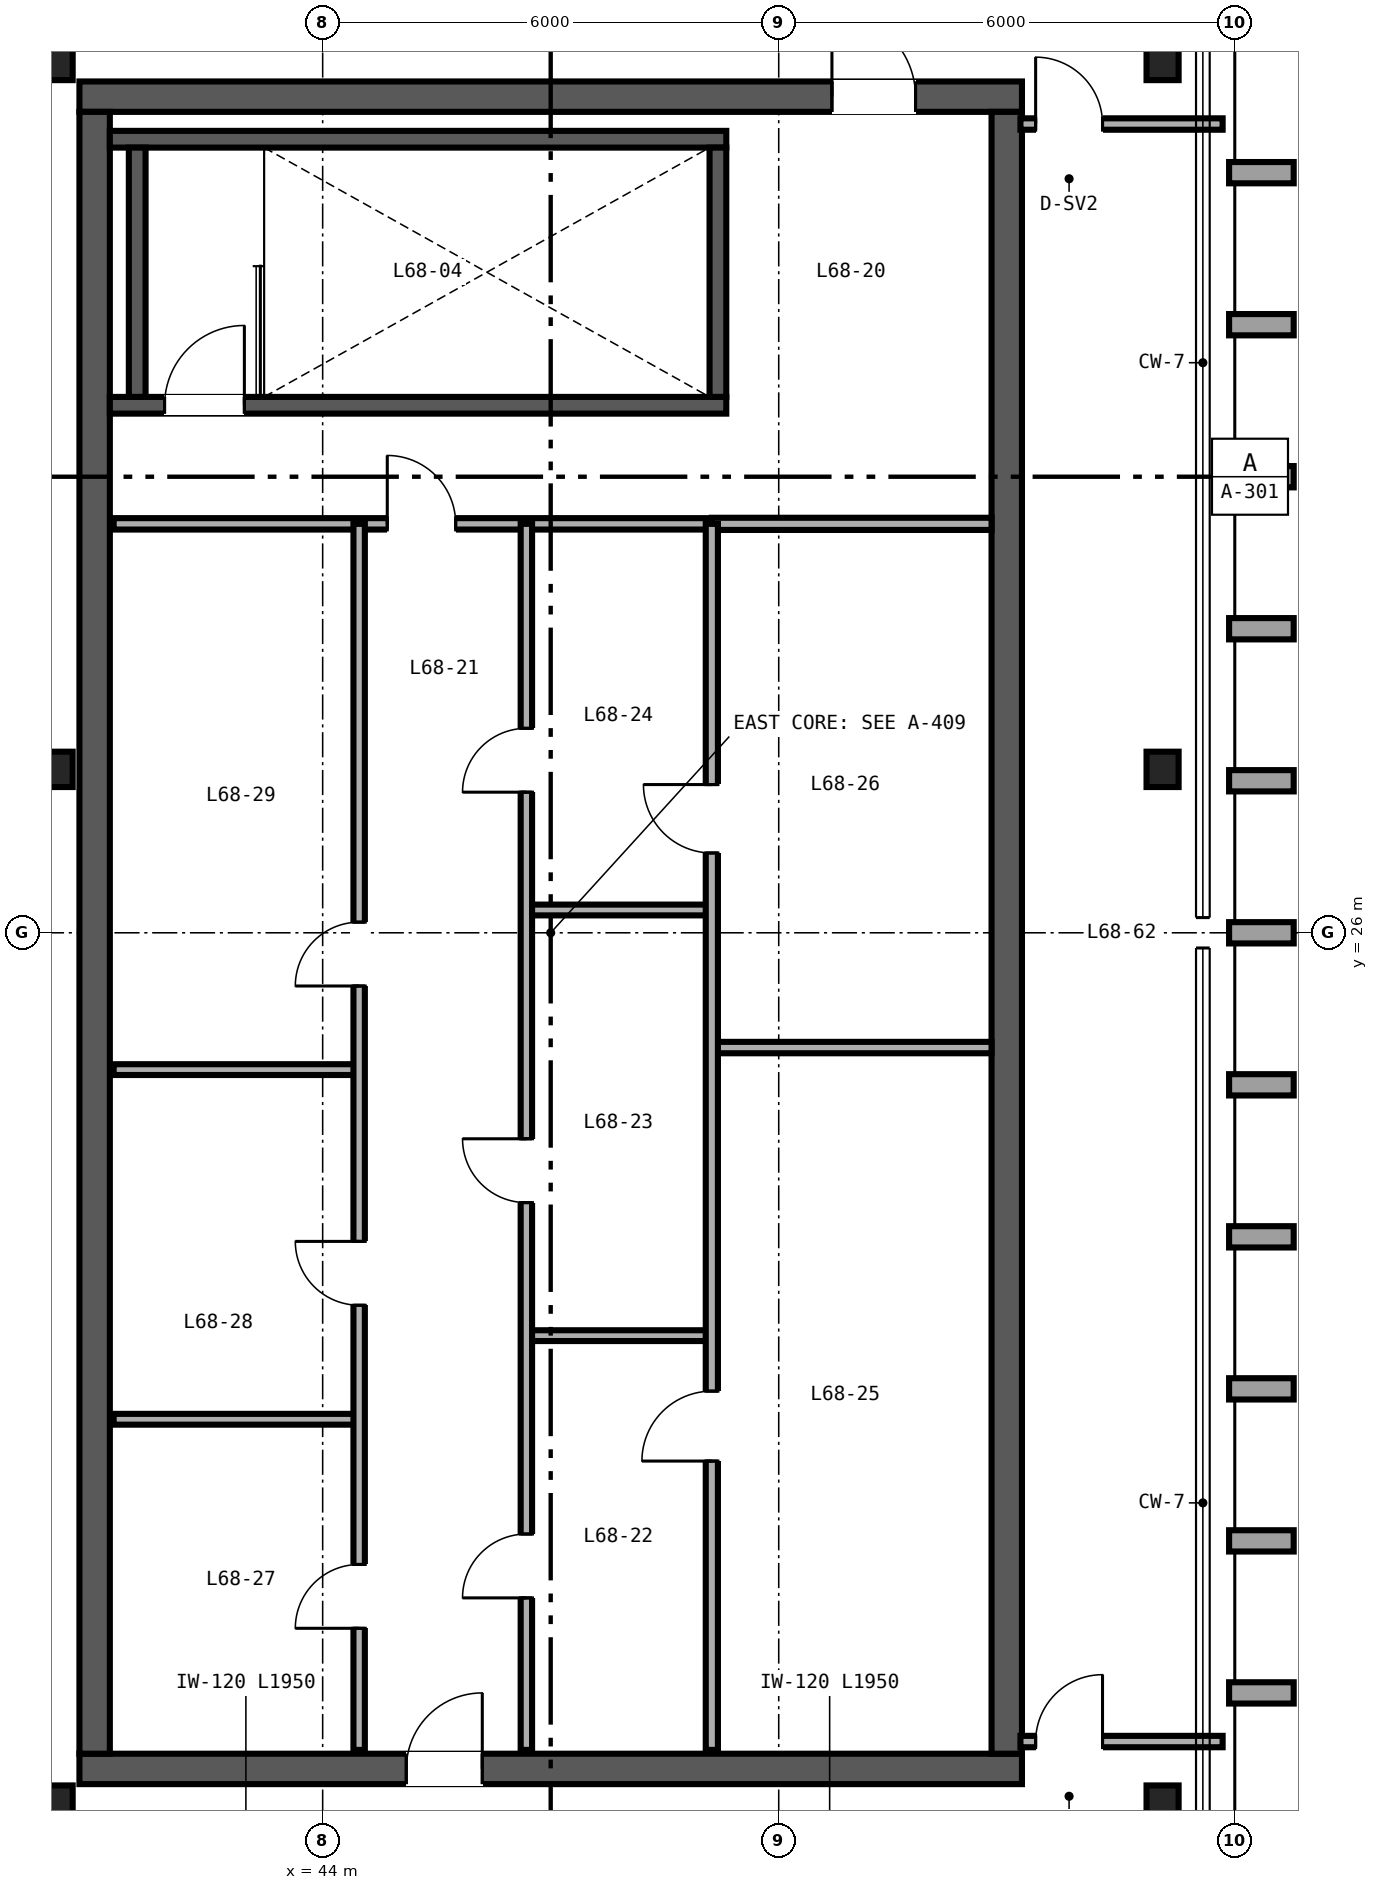
"""IFC4 building model, lengths in metres.
Left out: names, types, materials, properties, quantities, classifications, styles, units other than length and angle.
Written with IfcOpenShell. Run it as: python <this file> out.ifc"""

import sys

from ifc_helpers import new_model, si_unit, direction, frame, frame_2d, origin, origin_2d, place, context, subcontext, project, spatial, rectangle, i_section, extrude, source, transform, mapped, element, fill, save


model = new_model("IFC4")
c1 = context("Model", 3, precision=1e-05, world=origin(), true_north=direction((0.0, 1.0)))
c2 = subcontext(c1, "Body", "Model", "MODEL_VIEW")
j1 = project(units=[si_unit("LENGTHUNIT", "METRE"), si_unit("PLANEANGLEUNIT", "RADIAN")], contexts=[c1])
p1 = place(None, origin())
s1 = spatial("IfcSite", under=j1, at=p1, CompositionType="ELEMENT")
p2 = place(p1, origin())
s2 = spatial("IfcBuilding", under=s1, at=p2, CompositionType="ELEMENT")
p3 = place(p2, frame((0.0, 0.0, 268.8)))
s3 = spatial("IfcBuildingStorey", under=s2, at=p3, CompositionType="ELEMENT", Elevation=268.8)
p4 = place(p3, frame((40.8, 15.0, 0.0), z_axis=(0.0, 0.0, 1.0), x_axis=(1.0, 0.0, 0.0)))
e1 = element("IfcWall", 1, at=p4, inside=s3, PredefinedType="SHEAR", context=c2, shape_type="SweptSolid", body=[
    extrude(rectangle(XDim=12.4, YDim=0.4, at=frame_2d((6.2, 0.0))), origin(), (0.0, 0.0, 1.0), 3.28),
])
p5 = place(p4, frame((4.3, 0.0, 0.0)))
e2 = element("IfcOpeningElement", 2, at=p5, cuts=e1, PredefinedType="OPENING", context=c2, shape_type="SweptSolid", body=[
    extrude(rectangle(XDim=1.0, YDim=2.15, at=frame_2d((0.5, 1.075))), frame((0.0, 0.21, 0.0), z_axis=(0.0, -1.0, 0.0), x_axis=(1.0, 0.0, 0.0)), (0.0, 0.0, 1.0), 0.42),
])
p6 = place(p3, frame((40.8, 37.0, 0.0), z_axis=(0.0, 0.0, 1.0), x_axis=(1.0, 0.0, 0.0)))
e3 = element("IfcWall", 3, at=p6, inside=s3, PredefinedType="SHEAR", context=c2, shape_type="SweptSolid", body=[
    extrude(rectangle(XDim=12.4, YDim=0.4, at=frame_2d((6.2, 0.0))), origin(), (0.0, 0.0, 1.0), 3.28),
])
p7 = place(p6, frame((9.9, 0.0, 0.0)))
e4 = element("IfcOpeningElement", 4, at=p7, cuts=e3, PredefinedType="OPENING", context=c2, shape_type="SweptSolid", body=[
    extrude(rectangle(XDim=1.1, YDim=2.15, at=frame_2d((0.55, 1.075))), frame((0.0, 0.21, 0.0), z_axis=(0.0, -1.0, 0.0), x_axis=(1.0, 0.0, 0.0)), (0.0, 0.0, 1.0), 0.42),
])
for number, where, z_axis, x_axis in (
    (5, (41.0, 15.2, 0.0), (0.0, 0.0, 1.0), (0.0, 1.0, 0.0)),
    (6, (53.0, 15.2, 0.0), (0.0, 0.0, 1.0), (0.0, 1.0, 0.0)),
):
    element("IfcWall", number, at=place(p3, frame(where, z_axis=z_axis, x_axis=x_axis)), inside=s3, PredefinedType="SHEAR", context=c2, shape_type="SweptSolid", body=[
        extrude(rectangle(XDim=21.6, YDim=0.4, at=frame_2d((10.8, 0.0))), origin(), (0.0, 0.0, 1.0), 3.28),
    ])
p8 = place(p3, frame((41.2, 32.94, 0.0), z_axis=(0.0, 0.0, 1.0), x_axis=(1.0, 0.0, 0.0)))
e7 = element("IfcWall", 7, at=p8, inside=s3, PredefinedType="SHEAR", context=c2, shape_type="SweptSolid", body=[
    extrude(rectangle(XDim=8.11, YDim=0.22, at=frame_2d((4.055, 0.0))), origin(), (0.0, 0.0, 1.0), 3.4),
])
p9 = place(p8, frame((0.72, 0.0, 0.0)))
e8 = element("IfcOpeningElement", 8, at=p9, cuts=e7, PredefinedType="OPENING", context=c2, shape_type="SweptSolid", body=[
    extrude(rectangle(XDim=1.05, YDim=2.15, at=frame_2d((0.525, 1.075))), frame((0.0, 0.12, 0.0), z_axis=(0.0, -1.0, 0.0), x_axis=(1.0, 0.0, 0.0)), (0.0, 0.0, 1.0), 0.24),
])
p10 = place(p3, frame((41.2, 36.44, 0.0), z_axis=(0.0, 0.0, 1.0), x_axis=(1.0, 0.0, 0.0)))
e9 = element("IfcWall", 9, at=p10, inside=s3, PredefinedType="SHEAR", context=c2, shape_type="SweptSolid", body=[
    extrude(rectangle(XDim=8.11, YDim=0.22, at=frame_2d((4.055, 0.0))), origin(), (0.0, 0.0, 1.0), 3.4),
])
for number, where, z_axis, x_axis in (
    (10, (41.56, 33.05, 0.0), (0.0, 0.0, 1.0), (0.0, 1.0, 0.0)),
    (11, (49.2, 33.05, 0.0), (0.0, 0.0, 1.0), (0.0, 1.0, 0.0)),
):
    element("IfcWall", number, at=place(p3, frame(where, z_axis=z_axis, x_axis=x_axis)), inside=s3, PredefinedType="SHEAR", context=c2, shape_type="SweptSolid", body=[
        extrude(rectangle(XDim=3.28, YDim=0.22, at=frame_2d((1.64, 0.0))), origin(), (0.0, 0.0, 1.0), 3.4),
    ])
m1 = source(origin(), c2, "Body", "SweptSolid", [
    extrude(i_section(OverallWidth=0.422, OverallDepth=0.465, WebThickness=0.045, FlangeThickness=0.073, FilletRadius=0.025, at=origin_2d()), origin(), (0.0, 0.0, 1.0), 3.28),
])
for number, where, z_axis, x_axis in (
    (12, (40.5, 14.55, 0.0), (0.0, 0.0, 1.0), (1.0, 0.0, 0.0)),
    (13, (55.05, 14.55, 0.0), (0.0, 0.0, 1.0), (1.0, 0.0, 0.0)),
    (14, (40.5, 28.15, 0.0), (0.0, 0.0, 1.0), (1.0, 0.0, 0.0)),
    (15, (55.05, 28.15, 0.0), (0.0, 0.0, 1.0), (1.0, 0.0, 0.0)),
    (16, (40.5, 37.45, 0.0), (0.0, 0.0, 1.0), (1.0, 0.0, 0.0)),
    (17, (55.05, 37.45, 0.0), (0.0, 0.0, 1.0), (1.0, 0.0, 0.0)),
):
    element("IfcColumn", number, at=place(p3, frame(where, z_axis=z_axis, x_axis=x_axis)), inside=s3, PredefinedType="COLUMN", context=c2, shape_type="MappedRepresentation", body=[
        mapped(m1, transform((0.0, 0.0, 0.0), scale=1.0)),
    ])
p11 = place(p3, frame((41.25, 31.38, 0.0), z_axis=(0.0, 0.0, 1.0), x_axis=(1.0, 0.0, 0.0)))
e18 = element("IfcWall", 18, at=p11, inside=s3, PredefinedType="PARTITIONING", context=c2, shape_type="SweptSolid", body=[
    extrude(rectangle(XDim=7.87, YDim=0.15, at=frame_2d((3.935, 0.0))), origin(), (0.0, 0.0, 1.0), 2.38),
])
p12 = place(p11, frame((3.6, 0.0, 0.0)))
e19 = element("IfcOpeningElement", 19, at=p12, cuts=e18, PredefinedType="OPENING", context=c2, shape_type="SweptSolid", body=[
    extrude(rectangle(XDim=0.9, YDim=2.15, at=frame_2d((0.45, 1.075))), frame((0.0, 0.085, 0.0), z_axis=(0.0, -1.0, 0.0), x_axis=(1.0, 0.0, 0.0)), (0.0, 0.0, 1.0), 0.17),
])
for number, where, z_axis, x_axis in (
    (20, (46.68, 20.7, 0.0), (0.0, 0.0, 1.0), (1.0, 0.0, 0.0)),
    (21, (46.68, 26.3, 0.0), (0.0, 0.0, 1.0), (1.0, 0.0, 0.0)),
):
    element("IfcWall", number, at=place(p3, frame(where, z_axis=z_axis, x_axis=x_axis)), inside=s3, PredefinedType="PARTITIONING", context=c2, shape_type="SweptSolid", body=[
        extrude(rectangle(XDim=2.44, YDim=0.142, at=frame_2d((1.22, 0.0))), origin(), (0.0, 0.0, 1.0), 3.28),
    ])
p13 = place(p3, frame((46.68, 15.25, 0.0), z_axis=(0.0, 0.0, 1.0), x_axis=(0.0, 1.0, 0.0)))
e22 = element("IfcWall", 22, at=p13, inside=s3, PredefinedType="PARTITIONING", context=c2, shape_type="SweptSolid", body=[
    extrude(rectangle(XDim=16.13, YDim=0.15, at=frame_2d((8.065, 0.0))), origin(), (0.0, 0.0, 1.0), 2.36),
])
p14 = place(p13, frame((2.0, 0.0, 0.0)))
e23 = element("IfcOpeningElement", 23, at=p14, cuts=e22, PredefinedType="OPENING", context=c2, shape_type="SweptSolid", body=[
    extrude(rectangle(XDim=0.84, YDim=2.1, at=frame_2d((0.42, 1.05))), frame((0.0, 0.085, 0.0), z_axis=(0.0, -1.0, 0.0), x_axis=(1.0, 0.0, 0.0)), (0.0, 0.0, 1.0), 0.17),
])
p15 = place(p13, frame((7.2, 0.0, 0.0)))
e24 = element("IfcOpeningElement", 24, at=p15, cuts=e22, PredefinedType="OPENING", context=c2, shape_type="SweptSolid", body=[
    extrude(rectangle(XDim=0.84, YDim=2.1, at=frame_2d((0.42, 1.05))), frame((0.0, 0.085, 0.0), z_axis=(0.0, -1.0, 0.0), x_axis=(1.0, 0.0, 0.0)), (0.0, 0.0, 1.0), 0.17),
])
p16 = place(p13, frame((12.6, 0.0, 0.0)))
e25 = element("IfcOpeningElement", 25, at=p16, cuts=e22, PredefinedType="OPENING", context=c2, shape_type="SweptSolid", body=[
    extrude(rectangle(XDim=0.84, YDim=2.1, at=frame_2d((0.42, 1.05))), frame((0.0, 0.085, 0.0), z_axis=(0.0, -1.0, 0.0), x_axis=(1.0, 0.0, 0.0)), (0.0, 0.0, 1.0), 0.17),
])
p17 = place(p3, frame((49.12, 31.38, 0.0), z_axis=(0.0, 0.0, 1.0), x_axis=(1.0, 0.0, 0.0)))
e26 = element("IfcWall", 26, at=p17, inside=s3, PredefinedType="PARTITIONING", context=c2, shape_type="SweptSolid", body=[
    extrude(rectangle(XDim=3.68, YDim=0.16, at=frame_2d((1.84, 0.0))), origin(), (0.0, 0.0, 1.0), 2.38),
])
p18 = place(p3, frame((49.12, 24.49, 0.0), z_axis=(0.0, 0.0, 1.0), x_axis=(1.0, 0.0, 0.0)))
e27 = element("IfcWall", 27, at=p18, inside=s3, PredefinedType="PARTITIONING", context=c2, shape_type="SweptSolid", body=[
    extrude(rectangle(XDim=3.68, YDim=0.15, at=frame_2d((1.84, 0.0))), origin(), (0.0, 0.0, 1.0), 3.28),
])
p19 = place(p3, frame((49.12, 15.25, 0.0), z_axis=(0.0, 0.0, 1.0), x_axis=(0.0, 1.0, 0.0)))
e28 = element("IfcWall", 28, at=p19, inside=s3, PredefinedType="PARTITIONING", context=c2, shape_type="SweptSolid", body=[
    extrude(rectangle(XDim=16.13, YDim=0.16, at=frame_2d((8.065, 0.0))), origin(), (0.0, 0.0, 1.0), 2.36),
])
p20 = place(p19, frame((3.8, 0.0, 0.0)))
e29 = element("IfcOpeningElement", 29, at=p20, cuts=e28, PredefinedType="OPENING", context=c2, shape_type="SweptSolid", body=[
    extrude(rectangle(XDim=0.92, YDim=2.15, at=frame_2d((0.46, 1.075))), frame((0.0, 0.09, 0.0), z_axis=(0.0, -1.0, 0.0), x_axis=(1.0, 0.0, 0.0)), (0.0, 0.0, 1.0), 0.18),
])
p21 = place(p19, frame((11.8, 0.0, 0.0)))
e30 = element("IfcOpeningElement", 30, at=p21, cuts=e28, PredefinedType="OPENING", context=c2, shape_type="SweptSolid", body=[
    extrude(rectangle(XDim=0.9, YDim=2.15, at=frame_2d((0.45, 1.075))), frame((0.0, 0.09, 0.0), z_axis=(0.0, -1.0, 0.0), x_axis=(1.0, 0.0, 0.0)), (0.0, 0.0, 1.0), 0.18),
])
for number, where, z_axis, x_axis in (
    (31, (41.25, 19.6, 0.0), (0.0, 0.0, 1.0), (1.0, 0.0, 0.0)),
    (32, (41.25, 24.2, 0.0), (0.0, 0.0, 1.0), (1.0, 0.0, 0.0)),
):
    element("IfcWall", number, at=place(p3, frame(where, z_axis=z_axis, x_axis=x_axis)), inside=s3, PredefinedType="PARTITIONING", context=c2, shape_type="SweptSolid", body=[
        extrude(rectangle(XDim=3.23, YDim=0.142, at=frame_2d((1.615, 0.0))), origin(), (0.0, 0.0, 1.0), 3.28),
    ])
p22 = place(p3, frame((44.48, 15.25, 0.0), z_axis=(0.0, 0.0, 1.0), x_axis=(0.0, 1.0, 0.0)))
e33 = element("IfcWall", 33, at=p22, inside=s3, PredefinedType="PARTITIONING", context=c2, shape_type="SweptSolid", body=[
    extrude(rectangle(XDim=16.13, YDim=0.15, at=frame_2d((8.065, 0.0))), origin(), (0.0, 0.0, 1.0), 2.36),
])
p23 = place(p22, frame((1.6, 0.0, 0.0)))
e34 = element("IfcOpeningElement", 34, at=p23, cuts=e33, PredefinedType="OPENING", context=c2, shape_type="SweptSolid", body=[
    extrude(rectangle(XDim=0.84, YDim=2.1, at=frame_2d((0.42, 1.05))), frame((0.0, 0.085, 0.0), z_axis=(0.0, -1.0, 0.0), x_axis=(1.0, 0.0, 0.0)), (0.0, 0.0, 1.0), 0.17),
])
p24 = place(p22, frame((5.85, 0.0, 0.0)))
e35 = element("IfcOpeningElement", 35, at=p24, cuts=e33, PredefinedType="OPENING", context=c2, shape_type="SweptSolid", body=[
    extrude(rectangle(XDim=0.84, YDim=2.1, at=frame_2d((0.42, 1.05))), frame((0.0, 0.085, 0.0), z_axis=(0.0, -1.0, 0.0), x_axis=(1.0, 0.0, 0.0)), (0.0, 0.0, 1.0), 0.17),
])
p25 = place(p22, frame((10.05, 0.0, 0.0)))
e36 = element("IfcOpeningElement", 36, at=p25, cuts=e33, PredefinedType="OPENING", context=c2, shape_type="SweptSolid", body=[
    extrude(rectangle(XDim=0.84, YDim=2.1, at=frame_2d((0.42, 1.05))), frame((0.0, 0.085, 0.0), z_axis=(0.0, -1.0, 0.0), x_axis=(1.0, 0.0, 0.0)), (0.0, 0.0, 1.0), 0.17),
])
p26 = place(p3, frame((53.18, 15.36, 0.0), z_axis=(0.0, 0.0, 1.0), x_axis=(1.0, 0.0, 0.0)))
e37 = element("IfcWall", 37, at=p26, inside=s3, PredefinedType="PARTITIONING", context=c2, shape_type="SweptSolid", body=[
    extrude(rectangle(XDim=2.66, YDim=0.15, at=frame_2d((1.33, 0.0))), origin(), (0.0, 0.0, 1.0), 2.501),
])
p27 = place(p26, frame((0.2, 0.0, 0.0)))
e38 = element("IfcOpeningElement", 38, at=p27, cuts=e37, PredefinedType="OPENING", context=c2, shape_type="SweptSolid", body=[
    extrude(rectangle(XDim=0.88, YDim=2.15, at=frame_2d((0.44, 1.075))), frame((0.0, 0.085, 0.0), z_axis=(0.0, -1.0, 0.0), x_axis=(1.0, 0.0, 0.0)), (0.0, 0.0, 1.0), 0.17),
])
p28 = place(p3, frame((53.18, 36.64, 0.0), z_axis=(0.0, 0.0, 1.0), x_axis=(1.0, 0.0, 0.0)))
e39 = element("IfcWall", 39, at=p28, inside=s3, PredefinedType="PARTITIONING", context=c2, shape_type="SweptSolid", body=[
    extrude(rectangle(XDim=2.66, YDim=0.15, at=frame_2d((1.33, 0.0))), origin(), (0.0, 0.0, 1.0), 2.663),
])
p29 = place(p28, frame((0.2, 0.0, 0.0)))
e40 = element("IfcOpeningElement", 40, at=p29, cuts=e39, PredefinedType="OPENING", context=c2, shape_type="SweptSolid", body=[
    extrude(rectangle(XDim=0.88, YDim=2.15, at=frame_2d((0.44, 1.075))), frame((0.0, 0.085, 0.0), z_axis=(0.0, -1.0, 0.0), x_axis=(1.0, 0.0, 0.0)), (0.0, 0.0, 1.0), 0.17),
])
m2 = source(origin(), c2, "Body", "SweptSolid", [
    extrude(rectangle(XDim=1.05, YDim=2.15, at=frame_2d((0.525, 1.075))), frame((0.0, 0.025, 0.0), z_axis=(0.0, -1.0, 0.0), x_axis=(1.0, 0.0, 0.0)), (0.0, 0.0, 1.0), 0.05),
])
p30 = place(p9, origin())
e41 = element("IfcDoor", 41, at=p30, inside=s3, OperationType="SINGLE_SWING_RIGHT", PredefinedType="DOOR", context=c2, shape_type="MappedRepresentation", body=[
    mapped(m2, transform((0.0, 0.0, 0.0), scale=1.0)),
])
fill(e8, e41)
m3 = source(origin(), c2, "Body", "SweptSolid", [
    extrude(rectangle(XDim=0.84, YDim=2.1, at=frame_2d((0.42, 1.05))), frame((0.0, 0.025, 0.0), z_axis=(0.0, -1.0, 0.0), x_axis=(1.0, 0.0, 0.0)), (0.0, 0.0, 1.0), 0.05),
])
p31 = place(p14, origin())
e42 = element("IfcDoor", 42, at=p31, inside=s3, OperationType="SINGLE_SWING_LEFT", PredefinedType="DOOR", context=c2, shape_type="MappedRepresentation", body=[
    mapped(m3, transform((0.0, 0.0, 0.0), scale=1.0)),
])
fill(e23, e42)
p32 = place(p15, origin())
e43 = element("IfcDoor", 43, at=p32, inside=s3, OperationType="SINGLE_SWING_RIGHT", PredefinedType="DOOR", context=c2, shape_type="MappedRepresentation", body=[
    mapped(m3, transform((0.0, 0.0, 0.0), scale=1.0)),
])
fill(e24, e43)
p33 = place(p16, origin())
e44 = element("IfcDoor", 44, at=p33, inside=s3, OperationType="SINGLE_SWING_LEFT", PredefinedType="DOOR", context=c2, shape_type="MappedRepresentation", body=[
    mapped(m3, transform((0.0, 0.0, 0.0), scale=1.0)),
])
fill(e25, e44)
m4 = source(origin(), c2, "Body", "SweptSolid", [
    extrude(rectangle(XDim=0.9, YDim=2.15, at=frame_2d((0.45, 1.075))), frame((0.0, 0.025, 0.0), z_axis=(0.0, -1.0, 0.0), x_axis=(1.0, 0.0, 0.0)), (0.0, 0.0, 1.0), 0.05),
])
p34 = place(p12, origin())
e45 = element("IfcDoor", 45, at=p34, inside=s3, OperationType="SINGLE_SWING_LEFT", PredefinedType="DOOR", context=c2, shape_type="MappedRepresentation", body=[
    mapped(m4, transform((0.0, 0.0, 0.0), scale=1.0)),
])
fill(e19, e45)
m5 = source(origin(), c2, "Body", "SweptSolid", [
    extrude(rectangle(XDim=1.0, YDim=2.15, at=frame_2d((0.5, 1.075))), frame((0.0, 0.025, 0.0), z_axis=(0.0, -1.0, 0.0), x_axis=(1.0, 0.0, 0.0)), (0.0, 0.0, 1.0), 0.05),
])
p35 = place(p5, origin())
e46 = element("IfcDoor", 46, at=p35, inside=s3, OperationType="SINGLE_SWING_RIGHT", PredefinedType="DOOR", context=c2, shape_type="MappedRepresentation", body=[
    mapped(m5, transform((0.0, 0.0, 0.0), scale=1.0)),
])
fill(e2, e46)
m6 = source(origin(), c2, "Body", "SweptSolid", [
    extrude(rectangle(XDim=1.1, YDim=2.15, at=frame_2d((0.55, 1.075))), frame((0.0, 0.025, 0.0), z_axis=(0.0, -1.0, 0.0), x_axis=(1.0, 0.0, 0.0)), (0.0, 0.0, 1.0), 0.05),
])
p36 = place(p7, origin())
e47 = element("IfcDoor", 47, at=p36, inside=s3, OperationType="SINGLE_SWING_LEFT", PredefinedType="DOOR", context=c2, shape_type="MappedRepresentation", body=[
    mapped(m6, transform((0.0, 0.0, 0.0), scale=1.0)),
])
fill(e4, e47)
m7 = source(origin(), c2, "Body", "SweptSolid", [
    extrude(rectangle(XDim=0.92, YDim=2.15, at=frame_2d((0.46, 1.075))), frame((0.0, 0.025, 0.0), z_axis=(0.0, -1.0, 0.0), x_axis=(1.0, 0.0, 0.0)), (0.0, 0.0, 1.0), 0.05),
])
p37 = place(p20, origin())
e48 = element("IfcDoor", 48, at=p37, inside=s3, OperationType="SINGLE_SWING_LEFT", PredefinedType="DOOR", context=c2, shape_type="MappedRepresentation", body=[
    mapped(m7, transform((0.0, 0.0, 0.0), scale=1.0)),
])
fill(e29, e48)
p38 = place(p21, origin())
e49 = element("IfcDoor", 49, at=p38, inside=s3, OperationType="SINGLE_SWING_RIGHT", PredefinedType="DOOR", context=c2, shape_type="MappedRepresentation", body=[
    mapped(m4, transform((0.0, 0.0, 0.0), scale=1.0)),
])
fill(e30, e49)
p39 = place(p23, origin())
e50 = element("IfcDoor", 50, at=p39, inside=s3, OperationType="SINGLE_SWING_LEFT", PredefinedType="DOOR", context=c2, shape_type="MappedRepresentation", body=[
    mapped(m3, transform((0.0, 0.0, 0.0), scale=1.0)),
])
fill(e34, e50)
p40 = place(p24, origin())
e51 = element("IfcDoor", 51, at=p40, inside=s3, OperationType="SINGLE_SWING_RIGHT", PredefinedType="DOOR", context=c2, shape_type="MappedRepresentation", body=[
    mapped(m3, transform((0.0, 0.0, 0.0), scale=1.0)),
])
fill(e35, e51)
p41 = place(p25, origin())
e52 = element("IfcDoor", 52, at=p41, inside=s3, OperationType="SINGLE_SWING_LEFT", PredefinedType="DOOR", context=c2, shape_type="MappedRepresentation", body=[
    mapped(m3, transform((0.0, 0.0, 0.0), scale=1.0)),
])
fill(e36, e52)
m8 = source(origin(), c2, "Body", "SweptSolid", [
    extrude(rectangle(XDim=0.88, YDim=2.15, at=frame_2d((0.44, 1.075))), frame((0.0, 0.025, 0.0), z_axis=(0.0, -1.0, 0.0), x_axis=(1.0, 0.0, 0.0)), (0.0, 0.0, 1.0), 0.05),
])
p42 = place(p27, origin())
e53 = element("IfcDoor", 53, at=p42, inside=s3, OperationType="SINGLE_SWING_RIGHT", PredefinedType="DOOR", context=c2, shape_type="MappedRepresentation", body=[
    mapped(m8, transform((0.0, 0.0, 0.0), scale=1.0)),
])
fill(e38, e53)
p43 = place(p29, origin())
e54 = element("IfcDoor", 54, at=p43, inside=s3, OperationType="SINGLE_SWING_LEFT", PredefinedType="DOOR", context=c2, shape_type="MappedRepresentation", body=[
    mapped(m8, transform((0.0, 0.0, 0.0), scale=1.0)),
])
fill(e40, e54)
save(model, sys.argv[1])
